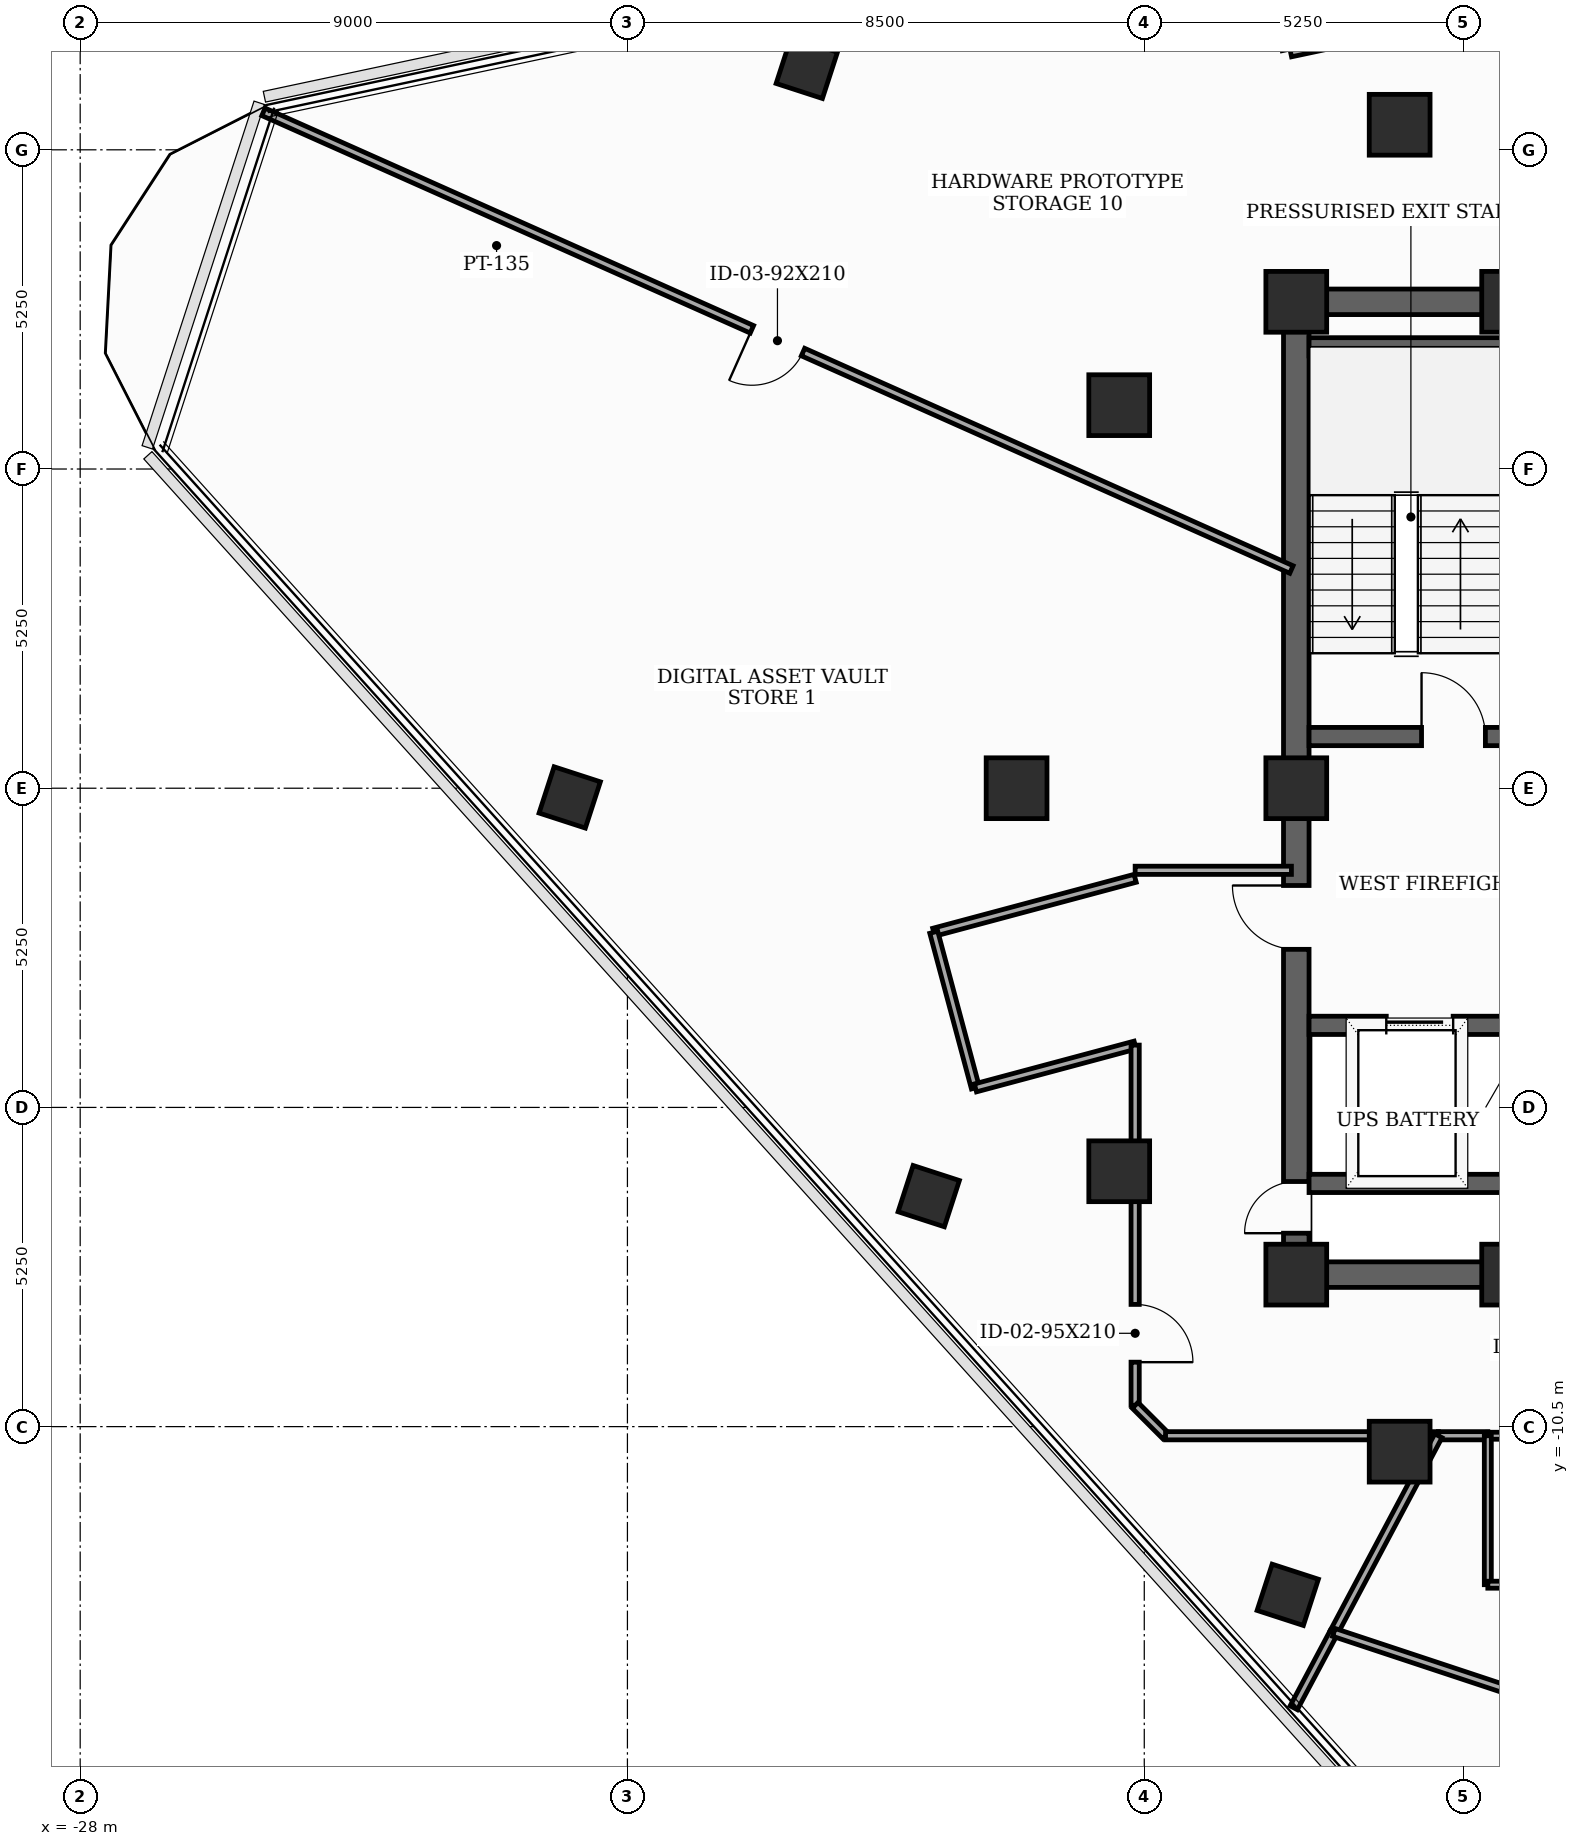
"""IFC4 building model, lengths in metres.
Left out: names, types, materials, properties, quantities, classifications, styles, units other than length and angle.
Written with IfcOpenShell. Run it as: python <this file> out.ifc"""

import sys

from ifc_helpers import new_model, si_unit, direction, frame, frame_2d, origin, origin_2d, place, context, subcontext, project, spatial, rectangle, extrude, element, fill, save


model = new_model("IFC4")
c1 = context("Model", 3, precision=1e-05, world=origin(), true_north=direction((0.0, 1.0)))
c2 = subcontext(c1, "Body", "Model", "MODEL_VIEW")
j1 = project(units=[si_unit("LENGTHUNIT", "METRE"), si_unit("PLANEANGLEUNIT", "RADIAN")], contexts=[c1])
p1 = place(None, origin())
s1 = spatial("IfcSite", under=j1, at=p1, CompositionType="ELEMENT")
p2 = place(p1, origin())
s2 = spatial("IfcBuilding", under=s1, at=p2, CompositionType="ELEMENT")
p3 = place(p2, frame((0.0, 0.0, 294.3)))
s3 = spatial("IfcBuildingStorey", under=s2, at=p3, CompositionType="ELEMENT", Elevation=294.3)
for number, where, z_axis, x_axis in (
    (1, (-8.0, -8.0, 0.0), (0.0, 0.0, 1.0), (1.0, 0.0, 0.0)),
    (2, (-4.45, -8.0, 0.0), (0.0, 0.0, 1.0), (1.0, 0.0, 0.0)),
    (3, (-4.45, 8.0, 0.0), (0.0, 0.0, 1.0), (1.0, 0.0, 0.0)),
    (4, (-8.0, 8.0, 0.0), (0.0, 0.0, 1.0), (1.0, 0.0, 0.0)),
    (5, (-8.0, 0.0, 0.0), (0.0, 0.0, 1.0), (1.0, 0.0, 0.0)),
    (6, (-6.3, 10.912, 0.0), (0.0, 0.0, 1.0), (1.0, 0.0, 0.0)),
    (7, (-10.912, 6.3, 0.0), (0.0, 0.0, 1.0), (1.0, 0.0, 0.0)),
    (8, (-12.6, 0.0, 0.0), (0.0, 0.0, 1.0), (1.0, 0.0, 0.0)),
    (9, (-10.912, -6.3, 0.0), (0.0, 0.0, 1.0), (1.0, 0.0, 0.0)),
    (10, (-6.3, -10.912, 0.0), (0.0, 0.0, 1.0), (1.0, 0.0, 0.0)),
):
    element("IfcColumn", number, at=place(p3, frame(where, z_axis=z_axis, x_axis=x_axis)), inside=s3, PredefinedType="COLUMN", context=c2, shape_type="SweptSolid", body=[
        extrude(rectangle(XDim=1.0, YDim=1.0, at=origin_2d()), origin(), (0.0, 0.0, 1.0), 3.7),
    ])
for number, where, z_axis, x_axis in (
    (11, (-16.05, 11.848, 0.0), (0.0, 0.0, 1.0), (0.309, 0.951, 0.0)),
    (12, (-19.949, -0.151, 0.0), (0.0, 0.0, 1.0), (0.309, 0.951, 0.0)),
    (13, (-14.045, -6.709, 0.0), (0.0, 0.0, 1.0), (0.309, 0.951, 0.0)),
    (14, (-8.14, -13.266, 0.0), (0.0, 0.0, 1.0), (0.309, 0.951, 0.0)),
):
    element("IfcColumn", number, at=place(p3, frame(where, z_axis=z_axis, x_axis=x_axis)), inside=s3, PredefinedType="COLUMN", context=c2, shape_type="SweptSolid", body=[
        extrude(rectangle(XDim=0.8, YDim=0.8, at=origin_2d()), origin(), (0.0, 0.0, 1.0), 3.7),
    ])
p4 = place(p3, frame((2.459, 14.402, 0.0), z_axis=(0.0, 0.0, 1.0), x_axis=(-0.978149082982, -0.207904717268, 0.0)))
e15 = element("IfcWall", 15, at=p4, inside=s3, PredefinedType="SOLIDWALL", context=c2, shape_type="SweptSolid", body=[
    extrude(rectangle(XDim=10.8, YDim=0.26, at=frame_2d((5.4, 0.0))), origin(), (0.0, 0.0, 1.0), 3.5),
])
p5 = place(p4, frame((1.6, 0.0, 0.85)))
e16 = element("IfcOpeningElement", 16, at=p5, cuts=e15, PredefinedType="OPENING", context=c2, shape_type="SweptSolid", body=[
    extrude(rectangle(XDim=2.2, YDim=1.25, at=frame_2d((1.1, 0.625))), frame((0.0, 0.14, 0.0), z_axis=(0.0, -1.0, 0.0), x_axis=(1.0, 0.0, 0.0)), (0.0, 0.0, 1.0), 0.28),
])
p6 = place(p4, frame((7.0, 0.0, 0.85)))
e17 = element("IfcOpeningElement", 17, at=p6, cuts=e15, PredefinedType="OPENING", context=c2, shape_type="SweptSolid", body=[
    extrude(rectangle(XDim=2.2, YDim=1.25, at=frame_2d((1.1, 0.625))), frame((0.0, 0.14, 0.0), z_axis=(0.0, -1.0, 0.0), x_axis=(1.0, 0.0, 0.0)), (0.0, 0.0, 1.0), 0.28),
])
p7 = place(p3, frame((-8.0, -8.0, 0.0), z_axis=(0.0, 0.0, 1.0), x_axis=(0.0, 1.0, 0.0)))
e18 = element("IfcWall", 18, at=p7, inside=s3, PredefinedType="SHEAR", context=c2, shape_type="SweptSolid", body=[
    extrude(rectangle(XDim=16.0, YDim=0.42, at=frame_2d((8.0, 0.0))), origin(), (0.0, 0.0, 1.0), 3.5),
])
p8 = place(p7, frame((0.681, 0.0, 0.0)))
e19 = element("IfcOpeningElement", 19, at=p8, cuts=e18, PredefinedType="OPENING", context=c2, shape_type="SweptSolid", body=[
    extrude(rectangle(XDim=0.85, YDim=2.02, at=frame_2d((0.425, 1.01))), frame((0.0, 0.22, 0.0), z_axis=(0.0, -1.0, 0.0), x_axis=(1.0, 0.0, 0.0)), (0.0, 0.0, 1.0), 0.44),
])
p9 = place(p7, frame((5.35, 0.0, 0.0)))
e20 = element("IfcOpeningElement", 20, at=p9, cuts=e18, PredefinedType="OPENING", context=c2, shape_type="SweptSolid", body=[
    extrude(rectangle(XDim=1.05, YDim=2.15, at=frame_2d((0.525, 1.075))), frame((0.0, 0.22, 0.0), z_axis=(0.0, -1.0, 0.0), x_axis=(1.0, 0.0, 0.0)), (0.0, 0.0, 1.0), 0.44),
])
p10 = place(p3, frame((-8.0, -8.0, 0.0), z_axis=(0.0, 0.0, 1.0), x_axis=(1.0, 0.0, 0.0)))
e21 = element("IfcWall", 21, at=p10, inside=s3, PredefinedType="SHEAR", context=c2, shape_type="SweptSolid", body=[
    extrude(rectangle(XDim=16.0, YDim=0.42, at=frame_2d((8.0, 0.0))), origin(), (0.0, 0.0, 1.0), 3.5),
])
p11 = place(p10, frame((5.2, 0.0, 0.0)))
e22 = element("IfcOpeningElement", 22, at=p11, cuts=e21, PredefinedType="OPENING", context=c2, shape_type="SweptSolid", body=[
    extrude(rectangle(XDim=0.95, YDim=2.1, at=frame_2d((0.475, 1.05))), frame((0.0, 0.22, 0.0), z_axis=(0.0, -1.0, 0.0), x_axis=(1.0, 0.0, 0.0)), (0.0, 0.0, 1.0), 0.44),
])
p12 = place(p10, frame((9.8, 0.0, 0.0)))
e23 = element("IfcOpeningElement", 23, at=p12, cuts=e21, PredefinedType="OPENING", context=c2, shape_type="SweptSolid", body=[
    extrude(rectangle(XDim=0.95, YDim=2.1, at=frame_2d((0.475, 1.05))), frame((0.0, 0.22, 0.0), z_axis=(0.0, -1.0, 0.0), x_axis=(1.0, 0.0, 0.0)), (0.0, 0.0, 1.0), 0.44),
])
p13 = place(p3, frame((-8.0, 8.0, 0.0), z_axis=(0.0, 0.0, 1.0), x_axis=(1.0, 0.0, 0.0)))
e24 = element("IfcWall", 24, at=p13, inside=s3, PredefinedType="SHEAR", context=c2, shape_type="SweptSolid", body=[
    extrude(rectangle(XDim=16.0, YDim=0.42, at=frame_2d((8.0, 0.0))), origin(), (0.0, 0.0, 1.0), 3.5),
])
p14 = place(p13, frame((7.1, 0.0, 0.0)))
e25 = element("IfcOpeningElement", 25, at=p14, cuts=e24, PredefinedType="OPENING", context=c2, shape_type="SweptSolid", body=[
    extrude(rectangle(XDim=1.8, YDim=2.15, at=frame_2d((0.9, 1.075))), frame((0.0, 0.22, 0.0), z_axis=(0.0, -1.0, 0.0), x_axis=(1.0, 0.0, 0.0)), (0.0, 0.0, 1.0), 0.44),
])
p15 = place(p3, frame((-7.79, 0.85, 0.0), z_axis=(0.0, 0.0, 1.0), x_axis=(1.0, 0.0, 0.0)))
e26 = element("IfcWall", 26, at=p15, inside=s3, PredefinedType="SHEAR", context=c2, shape_type="SweptSolid", body=[
    extrude(rectangle(XDim=3.34, YDim=0.3, at=frame_2d((1.67, 0.0))), origin(), (0.0, 0.0, 1.0), 3.5),
])
p16 = place(p15, frame((1.85, 0.0, 0.0)))
e27 = element("IfcOpeningElement", 27, at=p16, cuts=e26, PredefinedType="OPENING", context=c2, shape_type="SweptSolid", body=[
    extrude(rectangle(XDim=1.05, YDim=2.15, at=frame_2d((0.525, 1.075))), frame((0.0, 0.16, 0.0), z_axis=(0.0, -1.0, 0.0), x_axis=(1.0, 0.0, 0.0)), (0.0, 0.0, 1.0), 0.32),
])
p17 = place(p3, frame((-7.79, 7.26, 0.0), z_axis=(0.0, 0.0, 1.0), x_axis=(1.0, 0.0, 0.0)))
e28 = element("IfcWall", 28, at=p17, inside=s3, PredefinedType="SHEAR", context=c2, shape_type="SweptSolid", body=[
    extrude(rectangle(XDim=3.34, YDim=0.3, at=frame_2d((1.67, 0.0))), origin(), (0.0, 0.0, 1.0), 3.5),
])
p18 = place(p3, frame((-7.79, -3.9, 0.0), z_axis=(0.0, 0.0, 1.0), x_axis=(1.0, 0.0, 0.0)))
e29 = element("IfcWall", 29, at=p18, inside=s3, PredefinedType="SHEAR", context=c2, shape_type="SweptSolid", body=[
    extrude(rectangle(XDim=3.34, YDim=0.3, at=frame_2d((1.67, 0.0))), origin(), (0.0, 0.0, 1.0), 3.5),
])
p19 = place(p18, frame((1.27, 0.0, 0.0)))
e30 = element("IfcOpeningElement", 30, at=p19, cuts=e29, PredefinedType="OPENING", context=c2, shape_type="SweptSolid", body=[
    extrude(rectangle(XDim=1.1, YDim=2.1, at=frame_2d((0.55, 1.05))), frame((0.0, 0.16, 0.0), z_axis=(0.0, -1.0, 0.0), x_axis=(1.0, 0.0, 0.0)), (0.0, 0.0, 1.0), 0.32),
])
p20 = place(p3, frame((-7.79, -6.5, 0.0), z_axis=(0.0, 0.0, 1.0), x_axis=(1.0, 0.0, 0.0)))
e31 = element("IfcWall", 31, at=p20, inside=s3, PredefinedType="SHEAR", context=c2, shape_type="SweptSolid", body=[
    extrude(rectangle(XDim=3.34, YDim=0.3, at=frame_2d((1.67, 0.0))), origin(), (0.0, 0.0, 1.0), 3.5),
])
p21 = place(p3, frame((-8.08, -1.35, 0.0), z_axis=(0.0, 0.0, 1.0), x_axis=(-1.0, 0.0, 0.0)))
e32 = element("IfcWall", 32, at=p21, inside=s3, PredefinedType="PARTITIONING", context=c2, shape_type="SweptSolid", body=[
    extrude(rectangle(XDim=2.57, YDim=0.135, at=frame_2d((1.285, 0.0))), origin(), (0.0, 0.0, 1.0), 2.885),
])
p22 = place(p3, frame((-10.65, -1.482, 0.0), z_axis=(0.0, 0.0, 1.0), x_axis=(-0.965961397105, -0.2586862565, 0.0)))
e33 = element("IfcWall", 33, at=p22, inside=s3, PredefinedType="PARTITIONING", context=c2, shape_type="SweptSolid", body=[
    extrude(rectangle(XDim=3.429, YDim=0.135, at=frame_2d((1.714, 0.0))), origin(), (0.0, 0.0, 1.0), 2.885),
])
p23 = place(p3, frame((-13.962, -2.369, 0.0), z_axis=(0.0, 0.0, 1.0), x_axis=(0.258413725385, -0.966034340245, 0.0)))
e34 = element("IfcWall", 34, at=p23, inside=s3, PredefinedType="PARTITIONING", context=c2, shape_type="SweptSolid", body=[
    extrude(rectangle(XDim=2.65, YDim=0.135, at=frame_2d((1.325, 0.0))), origin(), (0.0, 0.0, 1.0), 3.5),
])
p24 = place(p3, frame((-13.277, -4.929, 0.0), z_axis=(0.0, 0.0, 1.0), x_axis=(0.965934830229, 0.258785439601, 0.0)))
e35 = element("IfcWall", 35, at=p24, inside=s3, PredefinedType="PARTITIONING", context=c2, shape_type="SweptSolid", body=[
    extrude(rectangle(XDim=2.72, YDim=0.135, at=frame_2d((1.36, 0.0))), origin(), (0.0, 0.0, 1.0), 2.885),
])
p25 = place(p3, frame((-10.65, -4.225, 0.0), z_axis=(0.0, 0.0, 1.0), x_axis=(0.0, -1.0, 0.0)))
e36 = element("IfcWall", 36, at=p25, inside=s3, PredefinedType="PARTITIONING", context=c2, shape_type="SweptSolid", body=[
    extrude(rectangle(XDim=5.925, YDim=0.135, at=frame_2d((2.962, 0.0))), origin(), (0.0, 0.0, 1.0), 2.885),
])
p26 = place(p25, frame((4.265, 0.0, 0.0)))
e37 = element("IfcOpeningElement", 37, at=p26, cuts=e36, PredefinedType="OPENING", context=c2, shape_type="SweptSolid", body=[
    extrude(rectangle(XDim=0.95, YDim=2.1, at=frame_2d((0.475, 1.05))), frame((0.0, 0.077, 0.0), z_axis=(0.0, -1.0, 0.0), x_axis=(1.0, 0.0, 0.0)), (0.0, 0.0, 1.0), 0.155),
])
p27 = place(p3, frame((-10.65, -10.15, 0.0), z_axis=(0.0, 0.0, 1.0), x_axis=(0.707106781187, -0.707106781187, 0.0)))
e38 = element("IfcWall", 38, at=p27, inside=s3, PredefinedType="PARTITIONING", context=c2, shape_type="SweptSolid", body=[
    extrude(rectangle(XDim=0.707, YDim=0.135, at=frame_2d((0.354, 0.0))), origin(), (0.0, 0.0, 1.0), 3.035),
])
p28 = place(p3, frame((-10.15, -10.65, 0.0), z_axis=(0.0, 0.0, 1.0), x_axis=(1.0, 0.0, 0.0)))
e39 = element("IfcWall", 39, at=p28, inside=s3, PredefinedType="PARTITIONING", context=c2, shape_type="SweptSolid", body=[
    extrude(rectangle(XDim=4.487, YDim=0.135, at=frame_2d((2.243, 0.0))), origin(), (0.0, 0.0, 1.0), 2.885),
])
p29 = place(p3, frame((-4.85, -10.65, 0.0), z_axis=(0.0, 0.0, 1.0), x_axis=(1.0, 0.0, 0.0)))
e40 = element("IfcWall", 40, at=p29, inside=s3, PredefinedType="PARTITIONING", context=c2, shape_type="SweptSolid", body=[
    extrude(rectangle(XDim=2.4, YDim=0.115, at=frame_2d((1.2, 0.0))), origin(), (0.0, 0.0, 1.0), 3.5),
])
p30 = place(p29, frame((0.74, 0.0, 0.0)))
e41 = element("IfcOpeningElement", 41, at=p30, cuts=e40, PredefinedType="OPENING", context=c2, shape_type="SweptSolid", body=[
    extrude(rectangle(XDim=0.92, YDim=2.1, at=frame_2d((0.46, 1.05))), frame((0.0, 0.067, 0.0), z_axis=(0.0, -1.0, 0.0), x_axis=(1.0, 0.0, 0.0)), (0.0, 0.0, 1.0), 0.135),
])
p31 = place(p3, frame((-5.663, -10.65, 0.0), z_axis=(0.0, 0.0, 1.0), x_axis=(1.0, 0.0, 0.0)))
e42 = element("IfcWall", 42, at=p31, inside=s3, PredefinedType="PARTITIONING", context=c2, shape_type="SweptSolid", body=[
    extrude(rectangle(XDim=0.813, YDim=0.135, at=frame_2d((0.406, 0.0))), origin(), (0.0, 0.0, 1.0), 3.5),
])
p32 = place(p3, frame((-7.382, -13.884, 0.0), z_axis=(0.0, 0.0, 1.0), x_axis=(0.469338791783, 0.88301817565, 0.0)))
e43 = element("IfcWall", 43, at=p32, inside=s3, PredefinedType="PARTITIONING", context=c2, shape_type="SweptSolid", body=[
    extrude(rectangle(XDim=3.663, YDim=0.135, at=frame_2d((1.831, 0.0))), origin(), (0.0, 0.0, 1.0), 2.885),
])
p33 = place(p3, frame((-8.042, -15.124, 0.0), z_axis=(0.0, 0.0, 1.0), x_axis=(0.469595679185, 0.882881587808, 0.0)))
e44 = element("IfcWall", 44, at=p33, inside=s3, PredefinedType="PARTITIONING", context=c2, shape_type="SweptSolid", body=[
    extrude(rectangle(XDim=1.405, YDim=0.135, at=frame_2d((0.702, 0.0))), origin(), (0.0, 0.0, 1.0), 3.035),
])
p34 = place(p3, frame((-8.08, 3.597, 0.0), z_axis=(0.0, 0.0, 1.0), x_axis=(-0.913542590258, 0.406743083266, 0.0)))
e45 = element("IfcWall", 45, at=p34, inside=s3, PredefinedType="PARTITIONING", context=c2, shape_type="SweptSolid", body=[
    extrude(rectangle(XDim=18.505, YDim=0.135, at=frame_2d((9.252, 0.0))), origin(), (0.0, 0.0, 1.0), 2.885),
])
p35 = place(p34, frame((8.792, 0.0, 0.0)))
e46 = element("IfcOpeningElement", 46, at=p35, cuts=e45, PredefinedType="OPENING", context=c2, shape_type="SweptSolid", body=[
    extrude(rectangle(XDim=0.92, YDim=2.1, at=frame_2d((0.46, 1.05))), frame((0.0, 0.077, 0.0), z_axis=(0.0, -1.0, 0.0), x_axis=(1.0, 0.0, 0.0)), (0.0, 0.0, 1.0), 0.155),
])
p36 = place(p3, frame((-4.85, -10.65, 0.0), z_axis=(0.0, 0.0, 1.0), x_axis=(0.0, -1.0, 0.0)))
e47 = element("IfcWall", 47, at=p36, inside=s3, PredefinedType="PARTITIONING", context=c2, shape_type="SweptSolid", body=[
    extrude(rectangle(XDim=2.45, YDim=0.115, at=frame_2d((1.225, 0.0))), origin(), (0.0, 0.0, 1.0), 2.885),
])
p37 = place(p3, frame((-4.85, -13.1, 0.0), z_axis=(0.0, 0.0, 1.0), x_axis=(1.0, 0.0, 0.0)))
e48 = element("IfcWall", 48, at=p37, inside=s3, PredefinedType="PARTITIONING", context=c2, shape_type="SweptSolid", body=[
    extrude(rectangle(XDim=2.4, YDim=0.115, at=frame_2d((1.2, 0.0))), origin(), (0.0, 0.0, 1.0), 3.5),
])
p38 = place(p3, frame((-7.382, -13.884, 0.0), z_axis=(0.0, 0.0, 1.0), x_axis=(0.949247116003, -0.314531258795, 0.0)))
e49 = element("IfcWall", 49, at=p38, inside=s3, PredefinedType="PARTITIONING", context=c2, shape_type="SweptSolid", body=[
    extrude(rectangle(XDim=5.7, YDim=0.135, at=frame_2d((2.85, 0.0))), origin(), (0.0, 0.0, 1.0), 3.035),
])
p39 = place(p8, origin())
e50 = element("IfcDoor", 50, at=p39, inside=s3, OperationType="SINGLE_SWING_LEFT", PredefinedType="TRAPDOOR", context=c2, shape_type="SweptSolid", body=[
    extrude(rectangle(XDim=0.85, YDim=2.02, at=frame_2d((0.425, 1.01))), frame((0.0, 0.025, 0.0), z_axis=(0.0, -1.0, 0.0), x_axis=(1.0, 0.0, 0.0)), (0.0, 0.0, 1.0), 0.05),
])
fill(e19, e50)
p40 = place(p9, origin())
e51 = element("IfcDoor", 51, at=p40, inside=s3, OperationType="SINGLE_SWING_RIGHT", PredefinedType="DOOR", context=c2, shape_type="SweptSolid", body=[
    extrude(rectangle(XDim=1.05, YDim=2.15, at=frame_2d((0.525, 1.075))), frame((0.0, 0.025, 0.0), z_axis=(0.0, -1.0, 0.0), x_axis=(1.0, 0.0, 0.0)), (0.0, 0.0, 1.0), 0.05),
])
fill(e20, e51)
p41 = place(p16, origin())
e52 = element("IfcDoor", 52, at=p41, inside=s3, OperationType="SINGLE_SWING_LEFT", PredefinedType="DOOR", context=c2, shape_type="SweptSolid", body=[
    extrude(rectangle(XDim=1.05, YDim=2.15, at=frame_2d((0.525, 1.075))), frame((0.0, 0.025, 0.0), z_axis=(0.0, -1.0, 0.0), x_axis=(1.0, 0.0, 0.0)), (0.0, 0.0, 1.0), 0.05),
])
fill(e27, e52)
p42 = place(p19, origin())
e53 = element("IfcDoor", 53, at=p42, inside=s3, OperationType="SLIDING_TO_LEFT", PredefinedType="DOOR", context=c2, shape_type="SweptSolid", body=[
    extrude(rectangle(XDim=1.1, YDim=2.1, at=frame_2d((0.55, 1.05))), frame((0.0, 0.025, 0.0), z_axis=(0.0, -1.0, 0.0), x_axis=(1.0, 0.0, 0.0)), (0.0, 0.0, 1.0), 0.05),
])
fill(e30, e53)
p43 = place(p26, origin())
e54 = element("IfcDoor", 54, at=p43, inside=s3, OperationType="SINGLE_SWING_RIGHT", PredefinedType="DOOR", context=c2, shape_type="SweptSolid", body=[
    extrude(rectangle(XDim=0.95, YDim=2.1, at=frame_2d((0.475, 1.05))), frame((0.0, 0.025, 0.0), z_axis=(0.0, -1.0, 0.0), x_axis=(1.0, 0.0, 0.0)), (0.0, 0.0, 1.0), 0.05),
])
fill(e37, e54)
p44 = place(p35, origin())
e55 = element("IfcDoor", 55, at=p44, inside=s3, OperationType="SINGLE_SWING_RIGHT", PredefinedType="DOOR", context=c2, shape_type="SweptSolid", body=[
    extrude(rectangle(XDim=0.92, YDim=2.1, at=frame_2d((0.46, 1.05))), frame((0.0, 0.025, 0.0), z_axis=(0.0, -1.0, 0.0), x_axis=(1.0, 0.0, 0.0)), (0.0, 0.0, 1.0), 0.05),
])
fill(e46, e55)
save(model, sys.argv[1])
